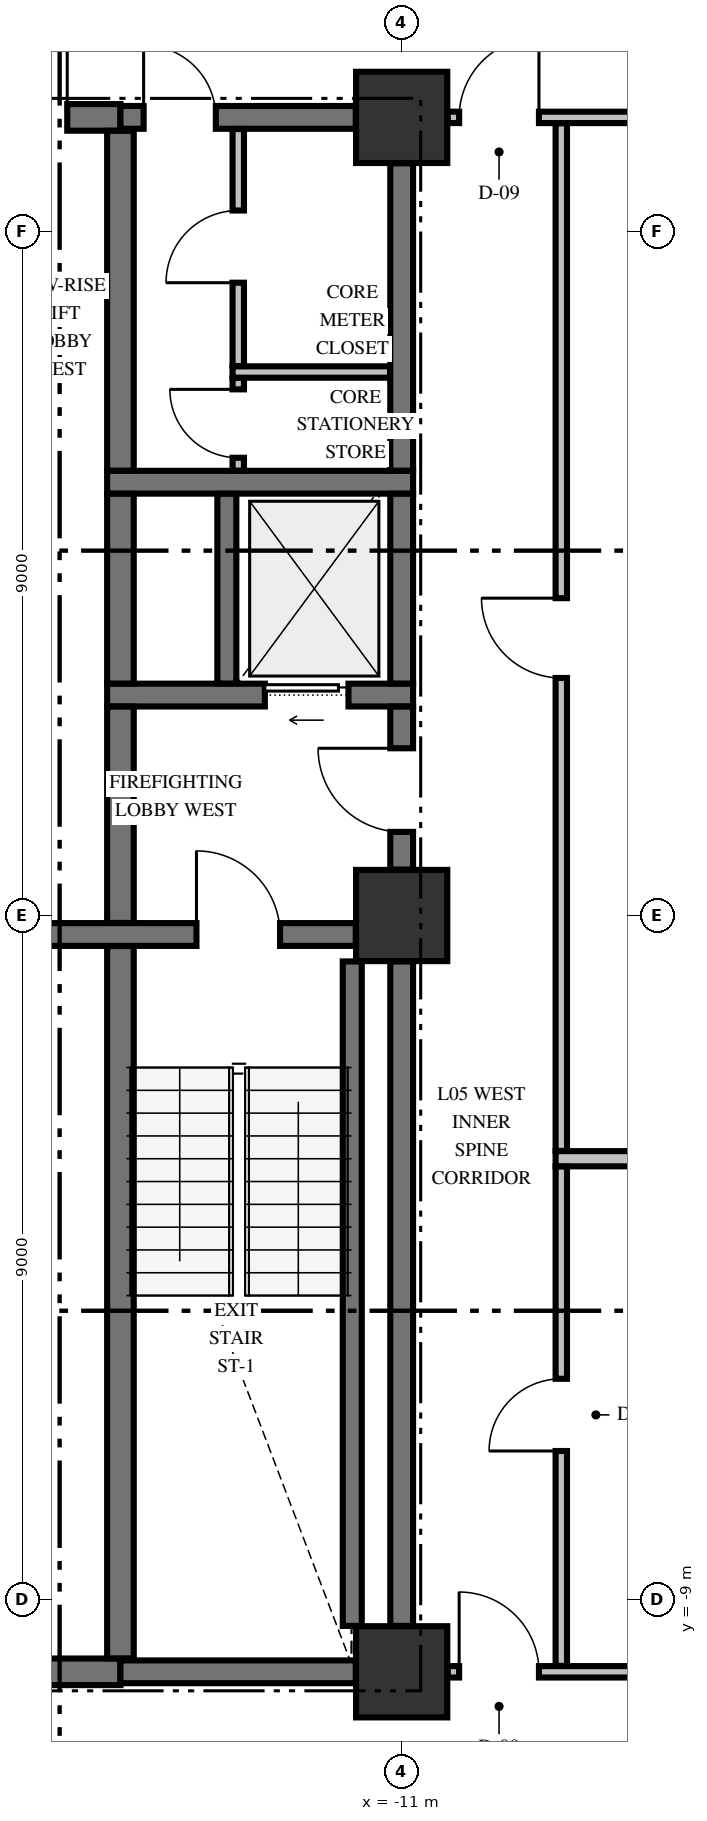
"""IFC4 building model, lengths in metres.
Left out: names, types, materials, properties, quantities, classifications, styles, units other than length and angle.
Written with IfcOpenShell. Run it as: python <this file> out.ifc"""

import sys

from ifc_helpers import new_model, si_unit, direction, frame, frame_2d, origin, origin_2d, place, context, subcontext, project, spatial, rectangle, extrude, element, fill, save


model = new_model("IFC4")
c1 = context("Model", 3, precision=1e-05, world=origin(), true_north=direction((0.0, 1.0)))
c2 = subcontext(c1, "Body", "Model", "MODEL_VIEW")
j1 = project(units=[si_unit("LENGTHUNIT", "METRE"), si_unit("PLANEANGLEUNIT", "RADIAN")], contexts=[c1])
p1 = place(None, origin())
s1 = spatial("IfcSite", under=j1, at=p1, CompositionType="ELEMENT")
p2 = place(p1, origin())
s2 = spatial("IfcBuilding", under=s1, at=p2, CompositionType="ELEMENT")
p3 = place(p2, frame((0.0, 0.0, 27.2)))
s3 = spatial("IfcBuildingStorey", under=s2, at=p3, CompositionType="ELEMENT", Elevation=27.2)
for number, where, z_axis, x_axis in (
    (1, (-11.0, -9.95, -0.45), (0.0, 0.0, 1.0), (1.0, 0.0, 0.0)),
    (2, (-11.0, 0.0, -0.45), (0.0, 0.0, 1.0), (1.0, 0.0, 0.0)),
    (3, (-11.0, 10.5, -0.45), (0.0, 0.0, 1.0), (1.0, 0.0, 0.0)),
):
    element("IfcColumn", number, at=place(p3, frame(where, z_axis=z_axis, x_axis=x_axis)), inside=s3, PredefinedType="COLUMN", context=c2, shape_type="SweptSolid", body=[
        extrude(rectangle(XDim=1.2, YDim=1.2, at=origin_2d()), origin(), (0.0, 0.0, 1.0), 3.77),
    ])
p4 = place(p3, frame((-19.396, -9.95, 0.0), z_axis=(0.0, 0.0, 1.0), x_axis=(1.0, 0.0, 0.0)))
e4 = element("IfcWall", 4, at=p4, inside=s3, PredefinedType="SHEAR", context=c2, shape_type="SweptSolid", body=[
    extrude(rectangle(XDim=4.696, YDim=0.35, at=frame_2d((2.348, 0.0))), origin(), (0.0, 0.0, 1.0), 3.32),
])
p5 = place(p4, frame((0.571, 0.0, 0.0)))
e5 = element("IfcOpeningElement", 5, at=p5, cuts=e4, PredefinedType="OPENING", context=c2, shape_type="SweptSolid", body=[
    extrude(rectangle(XDim=1.05, YDim=2.15, at=frame_2d((0.525, 1.075))), frame((0.0, 0.185, 0.0), z_axis=(0.0, -1.0, 0.0), x_axis=(1.0, 0.0, 0.0)), (0.0, 0.0, 1.0), 0.37),
])
p6 = place(p3, frame((-14.7, -9.95, 0.0), z_axis=(0.0, 0.0, 1.0), x_axis=(1.0, 0.0, 0.0)))
e6 = element("IfcWall", 6, at=p6, inside=s3, PredefinedType="SHEAR", context=c2, shape_type="SweptSolid", body=[
    extrude(rectangle(XDim=3.096, YDim=0.3, at=frame_2d((1.548, 0.0))), origin(), (0.0, 0.0, 1.0), 3.32),
])
p7 = place(p3, frame((-19.396, -0.25, 0.0), z_axis=(0.0, 0.0, 1.0), x_axis=(1.0, 0.0, 0.0)))
e7 = element("IfcWall", 7, at=p7, inside=s3, PredefinedType="SHEAR", context=c2, shape_type="SweptSolid", body=[
    extrude(rectangle(XDim=7.792, YDim=0.3, at=frame_2d((3.896, 0.0))), origin(), (0.0, 0.0, 1.0), 3.32),
])
p8 = place(p7, frame((5.696, 0.0, 0.0)))
e8 = element("IfcOpeningElement", 8, at=p8, cuts=e7, PredefinedType="OPENING", context=c2, shape_type="SweptSolid", body=[
    extrude(rectangle(XDim=1.1, YDim=2.15, at=frame_2d((0.55, 1.075))), frame((0.0, 0.16, 0.0), z_axis=(0.0, -1.0, 0.0), x_axis=(1.0, 0.0, 0.0)), (0.0, 0.0, 1.0), 0.32),
])
p9 = place(p3, frame((-14.875, 2.9, 0.0), z_axis=(0.0, 0.0, 1.0), x_axis=(1.0, 0.0, 0.0)))
e9 = element("IfcWall", 9, at=p9, inside=s3, PredefinedType="SHEAR", context=c2, shape_type="SweptSolid", body=[
    extrude(rectangle(XDim=4.025, YDim=0.3, at=frame_2d((2.012, 0.0))), origin(), (0.0, 0.0, 1.0), 3.32),
])
p10 = place(p9, frame((2.075, 0.0, 0.0)))
e10 = element("IfcOpeningElement", 10, at=p10, cuts=e9, PredefinedType="OPENING", context=c2, shape_type="SweptSolid", body=[
    extrude(rectangle(XDim=1.1, YDim=2.2, at=frame_2d((0.55, 1.1))), frame((0.0, 0.16, 0.0), z_axis=(0.0, -1.0, 0.0), x_axis=(1.0, 0.0, 0.0)), (0.0, 0.0, 1.0), 0.32),
])
p11 = place(p3, frame((-14.875, 5.7, 0.0), z_axis=(0.0, 0.0, 1.0), x_axis=(1.0, 0.0, 0.0)))
e11 = element("IfcWall", 11, at=p11, inside=s3, PredefinedType="SHEAR", context=c2, shape_type="SweptSolid", body=[
    extrude(rectangle(XDim=4.025, YDim=0.3, at=frame_2d((2.012, 0.0))), origin(), (0.0, 0.0, 1.0), 3.32),
])
p12 = place(p3, frame((-19.396, 10.5, 0.0), z_axis=(0.0, 0.0, 1.0), x_axis=(1.0, 0.0, 0.0)))
e12 = element("IfcWall", 12, at=p12, inside=s3, PredefinedType="SHEAR", context=c2, shape_type="SweptSolid", body=[
    extrude(rectangle(XDim=4.696, YDim=0.35, at=frame_2d((2.348, 0.0))), origin(), (0.0, 0.0, 1.0), 3.32),
])
p13 = place(p12, frame((2.796, 0.0, 0.0)))
e13 = element("IfcOpeningElement", 13, at=p13, cuts=e12, PredefinedType="OPENING", context=c2, shape_type="SweptSolid", body=[
    extrude(rectangle(XDim=1.2, YDim=2.15, at=frame_2d((0.6, 1.075))), frame((0.0, 0.185, 0.0), z_axis=(0.0, -1.0, 0.0), x_axis=(1.0, 0.0, 0.0)), (0.0, 0.0, 1.0), 0.37),
])
p14 = place(p3, frame((-14.7, 10.5, 0.0), z_axis=(0.0, 0.0, 1.0), x_axis=(1.0, 0.0, 0.0)))
e14 = element("IfcWall", 14, at=p14, inside=s3, PredefinedType="SHEAR", context=c2, shape_type="SweptSolid", body=[
    extrude(rectangle(XDim=3.096, YDim=0.3, at=frame_2d((1.548, 0.0))), origin(), (0.0, 0.0, 1.0), 3.32),
])
p15 = place(p14, frame((0.305, 0.0, 0.0)))
e15 = element("IfcOpeningElement", 15, at=p15, cuts=e14, PredefinedType="OPENING", context=c2, shape_type="SweptSolid", body=[
    extrude(rectangle(XDim=0.95, YDim=2.15, at=frame_2d((0.475, 1.075))), frame((0.0, 0.16, 0.0), z_axis=(0.0, -1.0, 0.0), x_axis=(1.0, 0.0, 0.0)), (0.0, 0.0, 1.0), 0.32),
])
p16 = place(p3, frame((-10.394, -9.95, 0.0), z_axis=(0.0, 0.0, 1.0), x_axis=(1.0, 0.0, 0.0)))
e16 = element("IfcWall", 16, at=p16, inside=s3, PredefinedType="PARTITIONING", context=c2, shape_type="SweptSolid", body=[
    extrude(rectangle(XDim=20.788, YDim=0.15, at=frame_2d((10.394, 0.0))), origin(), (0.0, 0.0, 1.0), 3.32),
])
p17 = place(p16, frame((0.15, 0.0, 0.0)))
e17 = element("IfcOpeningElement", 17, at=p17, cuts=e16, PredefinedType="OPENING", context=c2, shape_type="SweptSolid", body=[
    extrude(rectangle(XDim=1.05, YDim=2.15, at=frame_2d((0.525, 1.075))), frame((0.0, 0.085, 0.0), z_axis=(0.0, -1.0, 0.0), x_axis=(1.0, 0.0, 0.0)), (0.0, 0.0, 1.0), 0.17),
])
p18 = place(p16, frame((19.588, 0.0, 0.0)))
e18 = element("IfcOpeningElement", 18, at=p18, cuts=e16, PredefinedType="OPENING", context=c2, shape_type="SweptSolid", body=[
    extrude(rectangle(XDim=1.05, YDim=2.15, at=frame_2d((0.525, 1.075))), frame((0.0, 0.085, 0.0), z_axis=(0.0, -1.0, 0.0), x_axis=(1.0, 0.0, 0.0)), (0.0, 0.0, 1.0), 0.17),
])
p19 = place(p16, frame((11.969, 0.0, 0.0)))
e19 = element("IfcOpeningElement", 19, at=p19, cuts=e16, PredefinedType="OPENING", context=c2, shape_type="SweptSolid", body=[
    extrude(rectangle(XDim=0.95, YDim=2.15, at=frame_2d((0.475, 1.075))), frame((0.0, 0.085, 0.0), z_axis=(0.0, -1.0, 0.0), x_axis=(1.0, 0.0, 0.0)), (0.0, 0.0, 1.0), 0.17),
])
p20 = place(p3, frame((-8.975, -3.2, 0.0), z_axis=(0.0, 0.0, 1.0), x_axis=(1.0, 0.0, 0.0)))
e20 = element("IfcWall", 20, at=p20, inside=s3, PredefinedType="PARTITIONING", context=c2, shape_type="SweptSolid", body=[
    extrude(rectangle(XDim=7.275, YDim=0.2, at=frame_2d((3.638, 0.0))), origin(), (0.0, 0.0, 1.0), 3.32),
])
p21 = place(p3, frame((-13.225, 7.15, 0.0), z_axis=(0.0, 0.0, 1.0), x_axis=(1.0, 0.0, 0.0)))
e21 = element("IfcWall", 21, at=p21, inside=s3, PredefinedType="PARTITIONING", context=c2, shape_type="SweptSolid", body=[
    extrude(rectangle(XDim=2.072, YDim=0.15, at=frame_2d((1.036, 0.0))), origin(), (0.0, 0.0, 1.0), 3.32),
])
p22 = place(p3, frame((-10.394, 10.5, 0.0), z_axis=(0.0, 0.0, 1.0), x_axis=(1.0, 0.0, 0.0)))
e22 = element("IfcWall", 22, at=p22, inside=s3, PredefinedType="PARTITIONING", context=c2, shape_type="SweptSolid", body=[
    extrude(rectangle(XDim=20.788, YDim=0.15, at=frame_2d((10.394, 0.0))), origin(), (0.0, 0.0, 1.0), 3.32),
])
p23 = place(p22, frame((0.15, 0.0, 0.0)))
e23 = element("IfcOpeningElement", 23, at=p23, cuts=e22, PredefinedType="OPENING", context=c2, shape_type="SweptSolid", body=[
    extrude(rectangle(XDim=1.05, YDim=2.15, at=frame_2d((0.525, 1.075))), frame((0.0, 0.085, 0.0), z_axis=(0.0, -1.0, 0.0), x_axis=(1.0, 0.0, 0.0)), (0.0, 0.0, 1.0), 0.17),
])
p24 = place(p22, frame((19.588, 0.0, 0.0)))
e24 = element("IfcOpeningElement", 24, at=p24, cuts=e22, PredefinedType="OPENING", context=c2, shape_type="SweptSolid", body=[
    extrude(rectangle(XDim=1.05, YDim=2.15, at=frame_2d((0.525, 1.075))), frame((0.0, 0.085, 0.0), z_axis=(0.0, -1.0, 0.0), x_axis=(1.0, 0.0, 0.0)), (0.0, 0.0, 1.0), 0.17),
])
p25 = place(p3, frame((-14.7, -9.773, 0.0), z_axis=(0.0, 0.0, 1.0), x_axis=(0.0, 1.0, 0.0)))
e25 = element("IfcWall", 25, at=p25, inside=s3, PredefinedType="SHEAR", context=c2, shape_type="SweptSolid", body=[
    extrude(rectangle(XDim=9.371, YDim=0.35, at=frame_2d((4.686, 0.0))), origin(), (0.0, 0.0, 1.0), 3.32),
])
p26 = place(p3, frame((-14.7, -0.098, 0.0), z_axis=(0.0, 0.0, 1.0), x_axis=(0.0, 1.0, 0.0)))
e26 = element("IfcWall", 26, at=p26, inside=s3, PredefinedType="SHEAR", context=c2, shape_type="SweptSolid", body=[
    extrude(rectangle(XDim=2.846, YDim=0.35, at=frame_2d((1.423, 0.0))), origin(), (0.0, 0.0, 1.0), 3.32),
])
p27 = place(p3, frame((-14.7, 3.052, 0.0), z_axis=(0.0, 0.0, 1.0), x_axis=(0.0, 1.0, 0.0)))
e27 = element("IfcWall", 27, at=p27, inside=s3, PredefinedType="SHEAR", context=c2, shape_type="SweptSolid", body=[
    extrude(rectangle(XDim=2.496, YDim=0.35, at=frame_2d((1.248, 0.0))), origin(), (0.0, 0.0, 1.0), 3.32),
])
p28 = place(p3, frame((-14.7, 5.852, 0.0), z_axis=(0.0, 0.0, 1.0), x_axis=(0.0, 1.0, 0.0)))
e28 = element("IfcWall", 28, at=p28, inside=s3, PredefinedType="SHEAR", context=c2, shape_type="SweptSolid", body=[
    extrude(rectangle(XDim=4.471, YDim=0.35, at=frame_2d((2.235, 0.0))), origin(), (0.0, 0.0, 1.0), 3.32),
])
p29 = place(p3, frame((-13.3, 3.052, 0.0), z_axis=(0.0, 0.0, 1.0), x_axis=(0.0, 1.0, 0.0)))
e29 = element("IfcWall", 29, at=p29, inside=s3, PredefinedType="SOLIDWALL", context=c2, shape_type="SweptSolid", body=[
    extrude(rectangle(XDim=2.496, YDim=0.25, at=frame_2d((1.248, 0.0))), origin(), (0.0, 0.0, 1.0), 3.32),
])
p30 = place(p3, frame((-11.65, -9.346, 0.0), z_axis=(0.0, 0.0, 1.0), x_axis=(0.0, 1.0, 0.0)))
e30 = element("IfcWall", 30, at=p30, inside=s3, PredefinedType="SOLIDWALL", context=c2, shape_type="SweptSolid", body=[
    extrude(rectangle(XDim=8.742, YDim=0.25, at=frame_2d((4.371, 0.0))), origin(), (0.0, 0.0, 1.0), 3.32),
])
p31 = place(p3, frame((-11.0, -9.346, 0.0), z_axis=(0.0, 0.0, 1.0), x_axis=(0.0, 1.0, 0.0)))
e31 = element("IfcWall", 31, at=p31, inside=s3, PredefinedType="SHEAR", context=c2, shape_type="SweptSolid", body=[
    extrude(rectangle(XDim=8.742, YDim=0.3, at=frame_2d((4.371, 0.0))), origin(), (0.0, 0.0, 1.0), 3.32),
])
p32 = place(p3, frame((-11.0, 0.604, 0.0), z_axis=(0.0, 0.0, 1.0), x_axis=(0.0, 1.0, 0.0)))
e32 = element("IfcWall", 32, at=p32, inside=s3, PredefinedType="SHEAR", context=c2, shape_type="SweptSolid", body=[
    extrude(rectangle(XDim=2.144, YDim=0.3, at=frame_2d((1.072, 0.0))), origin(), (0.0, 0.0, 1.0), 3.32),
])
p33 = place(p32, frame((0.496, 0.0, 0.0)))
e33 = element("IfcOpeningElement", 33, at=p33, cuts=e32, PredefinedType="OPENING", context=c2, shape_type="SweptSolid", body=[
    extrude(rectangle(XDim=1.1, YDim=2.15, at=frame_2d((0.55, 1.075))), frame((0.0, 0.16, 0.0), z_axis=(0.0, -1.0, 0.0), x_axis=(1.0, 0.0, 0.0)), (0.0, 0.0, 1.0), 0.32),
])
p34 = place(p3, frame((-11.0, 3.052, 0.0), z_axis=(0.0, 0.0, 1.0), x_axis=(0.0, 1.0, 0.0)))
e34 = element("IfcWall", 34, at=p34, inside=s3, PredefinedType="SHEAR", context=c2, shape_type="SweptSolid", body=[
    extrude(rectangle(XDim=2.496, YDim=0.3, at=frame_2d((1.248, 0.0))), origin(), (0.0, 0.0, 1.0), 3.32),
])
p35 = place(p3, frame((-11.0, 5.852, 0.0), z_axis=(0.0, 0.0, 1.0), x_axis=(0.0, 1.0, 0.0)))
e35 = element("IfcWall", 35, at=p35, inside=s3, PredefinedType="SHEAR", context=c2, shape_type="SweptSolid", body=[
    extrude(rectangle(XDim=4.044, YDim=0.3, at=frame_2d((2.022, 0.0))), origin(), (0.0, 0.0, 1.0), 3.32),
])
p36 = place(p3, frame((-13.15, 5.853, 0.0), z_axis=(0.0, 0.0, 1.0), x_axis=(0.0, 1.0, 0.0)))
e36 = element("IfcWall", 36, at=p36, inside=s3, PredefinedType="PARTITIONING", context=c2, shape_type="SweptSolid", body=[
    extrude(rectangle(XDim=1.219, YDim=0.15, at=frame_2d((0.609, 0.0))), origin(), (0.0, 0.0, 1.0), 3.32),
])
p37 = place(p36, frame((0.169, 0.0, 0.0)))
e37 = element("IfcOpeningElement", 37, at=p37, cuts=e36, PredefinedType="OPENING", context=c2, shape_type="SweptSolid", body=[
    extrude(rectangle(XDim=0.9, YDim=2.15, at=frame_2d((0.45, 1.075))), frame((0.0, 0.085, 0.0), z_axis=(0.0, -1.0, 0.0), x_axis=(1.0, 0.0, 0.0)), (0.0, 0.0, 1.0), 0.17),
])
p38 = place(p3, frame((-13.15, 7.228, 0.0), z_axis=(0.0, 0.0, 1.0), x_axis=(0.0, 1.0, 0.0)))
e38 = element("IfcWall", 38, at=p38, inside=s3, PredefinedType="PARTITIONING", context=c2, shape_type="SweptSolid", body=[
    extrude(rectangle(XDim=3.119, YDim=0.15, at=frame_2d((1.56, 0.0))), origin(), (0.0, 0.0, 1.0), 3.32),
])
p39 = place(p38, frame((1.097, 0.0, 0.0)))
e39 = element("IfcOpeningElement", 39, at=p39, cuts=e38, PredefinedType="OPENING", context=c2, shape_type="SweptSolid", body=[
    extrude(rectangle(XDim=0.95, YDim=2.15, at=frame_2d((0.475, 1.075))), frame((0.0, 0.085, 0.0), z_axis=(0.0, -1.0, 0.0), x_axis=(1.0, 0.0, 0.0)), (0.0, 0.0, 1.0), 0.17),
])
p40 = place(p3, frame((-8.9, -9.872, 0.0), z_axis=(0.0, 0.0, 1.0), x_axis=(0.0, 1.0, 0.0)))
e40 = element("IfcWall", 40, at=p40, inside=s3, PredefinedType="PARTITIONING", context=c2, shape_type="SweptSolid", body=[
    extrude(rectangle(XDim=6.569, YDim=0.15, at=frame_2d((3.285, 0.0))), origin(), (0.0, 0.0, 1.0), 3.32),
])
p41 = place(p40, frame((2.827, 0.0, 0.0)))
e41 = element("IfcOpeningElement", 41, at=p41, cuts=e40, PredefinedType="OPENING", context=c2, shape_type="SweptSolid", body=[
    extrude(rectangle(XDim=0.95, YDim=2.15, at=frame_2d((0.475, 1.075))), frame((0.0, 0.085, 0.0), z_axis=(0.0, -1.0, 0.0), x_axis=(1.0, 0.0, 0.0)), (0.0, 0.0, 1.0), 0.17),
])
p42 = place(p3, frame((-8.9, -3.097, 0.0), z_axis=(0.0, 0.0, 1.0), x_axis=(0.0, 1.0, 0.0)))
e42 = element("IfcWall", 42, at=p42, inside=s3, PredefinedType="PARTITIONING", context=c2, shape_type="SweptSolid", body=[
    extrude(rectangle(XDim=13.519, YDim=0.15, at=frame_2d((6.76, 0.0))), origin(), (0.0, 0.0, 1.0), 3.32),
])
p43 = place(p42, frame((6.222, 0.0, 0.0)))
e43 = element("IfcOpeningElement", 43, at=p43, cuts=e42, PredefinedType="OPENING", context=c2, shape_type="SweptSolid", body=[
    extrude(rectangle(XDim=1.05, YDim=2.15, at=frame_2d((0.525, 1.075))), frame((0.0, 0.085, 0.0), z_axis=(0.0, -1.0, 0.0), x_axis=(1.0, 0.0, 0.0)), (0.0, 0.0, 1.0), 0.17),
])
p44 = place(p8, origin())
e44 = element("IfcDoor", 44, at=p44, inside=s3, OperationType="SINGLE_SWING_LEFT", PredefinedType="DOOR", context=c2, shape_type="SweptSolid", body=[
    extrude(rectangle(XDim=1.1, YDim=2.15, at=frame_2d((0.55, 1.075))), frame((0.0, 0.025, 0.0), z_axis=(0.0, -1.0, 0.0), x_axis=(1.0, 0.0, 0.0)), (0.0, 0.0, 1.0), 0.05),
])
fill(e8, e44)
p45 = place(p33, origin())
e45 = element("IfcDoor", 45, at=p45, inside=s3, OperationType="SINGLE_SWING_RIGHT", PredefinedType="DOOR", context=c2, shape_type="SweptSolid", body=[
    extrude(rectangle(XDim=1.1, YDim=2.15, at=frame_2d((0.55, 1.075))), frame((0.0, 0.025, 0.0), z_axis=(0.0, -1.0, 0.0), x_axis=(1.0, 0.0, 0.0)), (0.0, 0.0, 1.0), 0.05),
])
fill(e33, e45)
p46 = place(p10, origin())
e46 = element("IfcDoor", 46, at=p46, inside=s3, OperationType="SLIDING_TO_LEFT", PredefinedType="DOOR", context=c2, shape_type="SweptSolid", body=[
    extrude(rectangle(XDim=1.1, YDim=2.2, at=frame_2d((0.55, 1.1))), frame((0.0, 0.025, 0.0), z_axis=(0.0, -1.0, 0.0), x_axis=(1.0, 0.0, 0.0)), (0.0, 0.0, 1.0), 0.05),
])
fill(e10, e46)
p47 = place(p15, origin())
e47 = element("IfcDoor", 47, at=p47, inside=s3, OperationType="SINGLE_SWING_LEFT", PredefinedType="DOOR", context=c2, shape_type="SweptSolid", body=[
    extrude(rectangle(XDim=0.95, YDim=2.15, at=frame_2d((0.475, 1.075))), frame((0.0, 0.025, 0.0), z_axis=(0.0, -1.0, 0.0), x_axis=(1.0, 0.0, 0.0)), (0.0, 0.0, 1.0), 0.05),
])
fill(e15, e47)
p48 = place(p37, origin())
e48 = element("IfcDoor", 48, at=p48, inside=s3, OperationType="SINGLE_SWING_RIGHT", PredefinedType="DOOR", context=c2, shape_type="SweptSolid", body=[
    extrude(rectangle(XDim=0.9, YDim=2.15, at=frame_2d((0.45, 1.075))), frame((0.0, 0.025, 0.0), z_axis=(0.0, -1.0, 0.0), x_axis=(1.0, 0.0, 0.0)), (0.0, 0.0, 1.0), 0.05),
])
fill(e37, e48)
p49 = place(p39, origin())
e49 = element("IfcDoor", 49, at=p49, inside=s3, OperationType="SINGLE_SWING_LEFT", PredefinedType="DOOR", context=c2, shape_type="SweptSolid", body=[
    extrude(rectangle(XDim=0.95, YDim=2.15, at=frame_2d((0.475, 1.075))), frame((0.0, 0.025, 0.0), z_axis=(0.0, -1.0, 0.0), x_axis=(1.0, 0.0, 0.0)), (0.0, 0.0, 1.0), 0.05),
])
fill(e39, e49)
p50 = place(p13, origin())
e50 = element("IfcDoor", 50, at=p50, inside=s3, OperationType="SINGLE_SWING_RIGHT", PredefinedType="DOOR", context=c2, shape_type="SweptSolid", body=[
    extrude(rectangle(XDim=1.2, YDim=2.15, at=frame_2d((0.6, 1.075))), frame((0.0, 0.025, 0.0), z_axis=(0.0, -1.0, 0.0), x_axis=(1.0, 0.0, 0.0)), (0.0, 0.0, 1.0), 0.05),
])
fill(e13, e50)
p51 = place(p23, origin())
e51 = element("IfcDoor", 51, at=p51, inside=s3, OperationType="SINGLE_SWING_RIGHT", PredefinedType="DOOR", context=c2, shape_type="SweptSolid", body=[
    extrude(rectangle(XDim=1.05, YDim=2.15, at=frame_2d((0.525, 1.075))), frame((0.0, 0.025, 0.0), z_axis=(0.0, -1.0, 0.0), x_axis=(1.0, 0.0, 0.0)), (0.0, 0.0, 1.0), 0.05),
])
fill(e23, e51)
p52 = place(p17, origin())
e52 = element("IfcDoor", 52, at=p52, inside=s3, OperationType="SINGLE_SWING_LEFT", PredefinedType="DOOR", context=c2, shape_type="SweptSolid", body=[
    extrude(rectangle(XDim=1.05, YDim=2.15, at=frame_2d((0.525, 1.075))), frame((0.0, 0.025, 0.0), z_axis=(0.0, -1.0, 0.0), x_axis=(1.0, 0.0, 0.0)), (0.0, 0.0, 1.0), 0.05),
])
fill(e17, e52)
p53 = place(p43, origin())
e53 = element("IfcDoor", 53, at=p53, inside=s3, OperationType="SINGLE_SWING_RIGHT", PredefinedType="DOOR", context=c2, shape_type="SweptSolid", body=[
    extrude(rectangle(XDim=1.05, YDim=2.15, at=frame_2d((0.525, 1.075))), frame((0.0, 0.025, 0.0), z_axis=(0.0, -1.0, 0.0), x_axis=(1.0, 0.0, 0.0)), (0.0, 0.0, 1.0), 0.05),
])
fill(e43, e53)
p54 = place(p41, origin())
e54 = element("IfcDoor", 54, at=p54, inside=s3, OperationType="SINGLE_SWING_LEFT", PredefinedType="DOOR", context=c2, shape_type="SweptSolid", body=[
    extrude(rectangle(XDim=0.95, YDim=2.15, at=frame_2d((0.475, 1.075))), frame((0.0, 0.025, 0.0), z_axis=(0.0, -1.0, 0.0), x_axis=(1.0, 0.0, 0.0)), (0.0, 0.0, 1.0), 0.05),
])
fill(e41, e54)
save(model, sys.argv[1])
